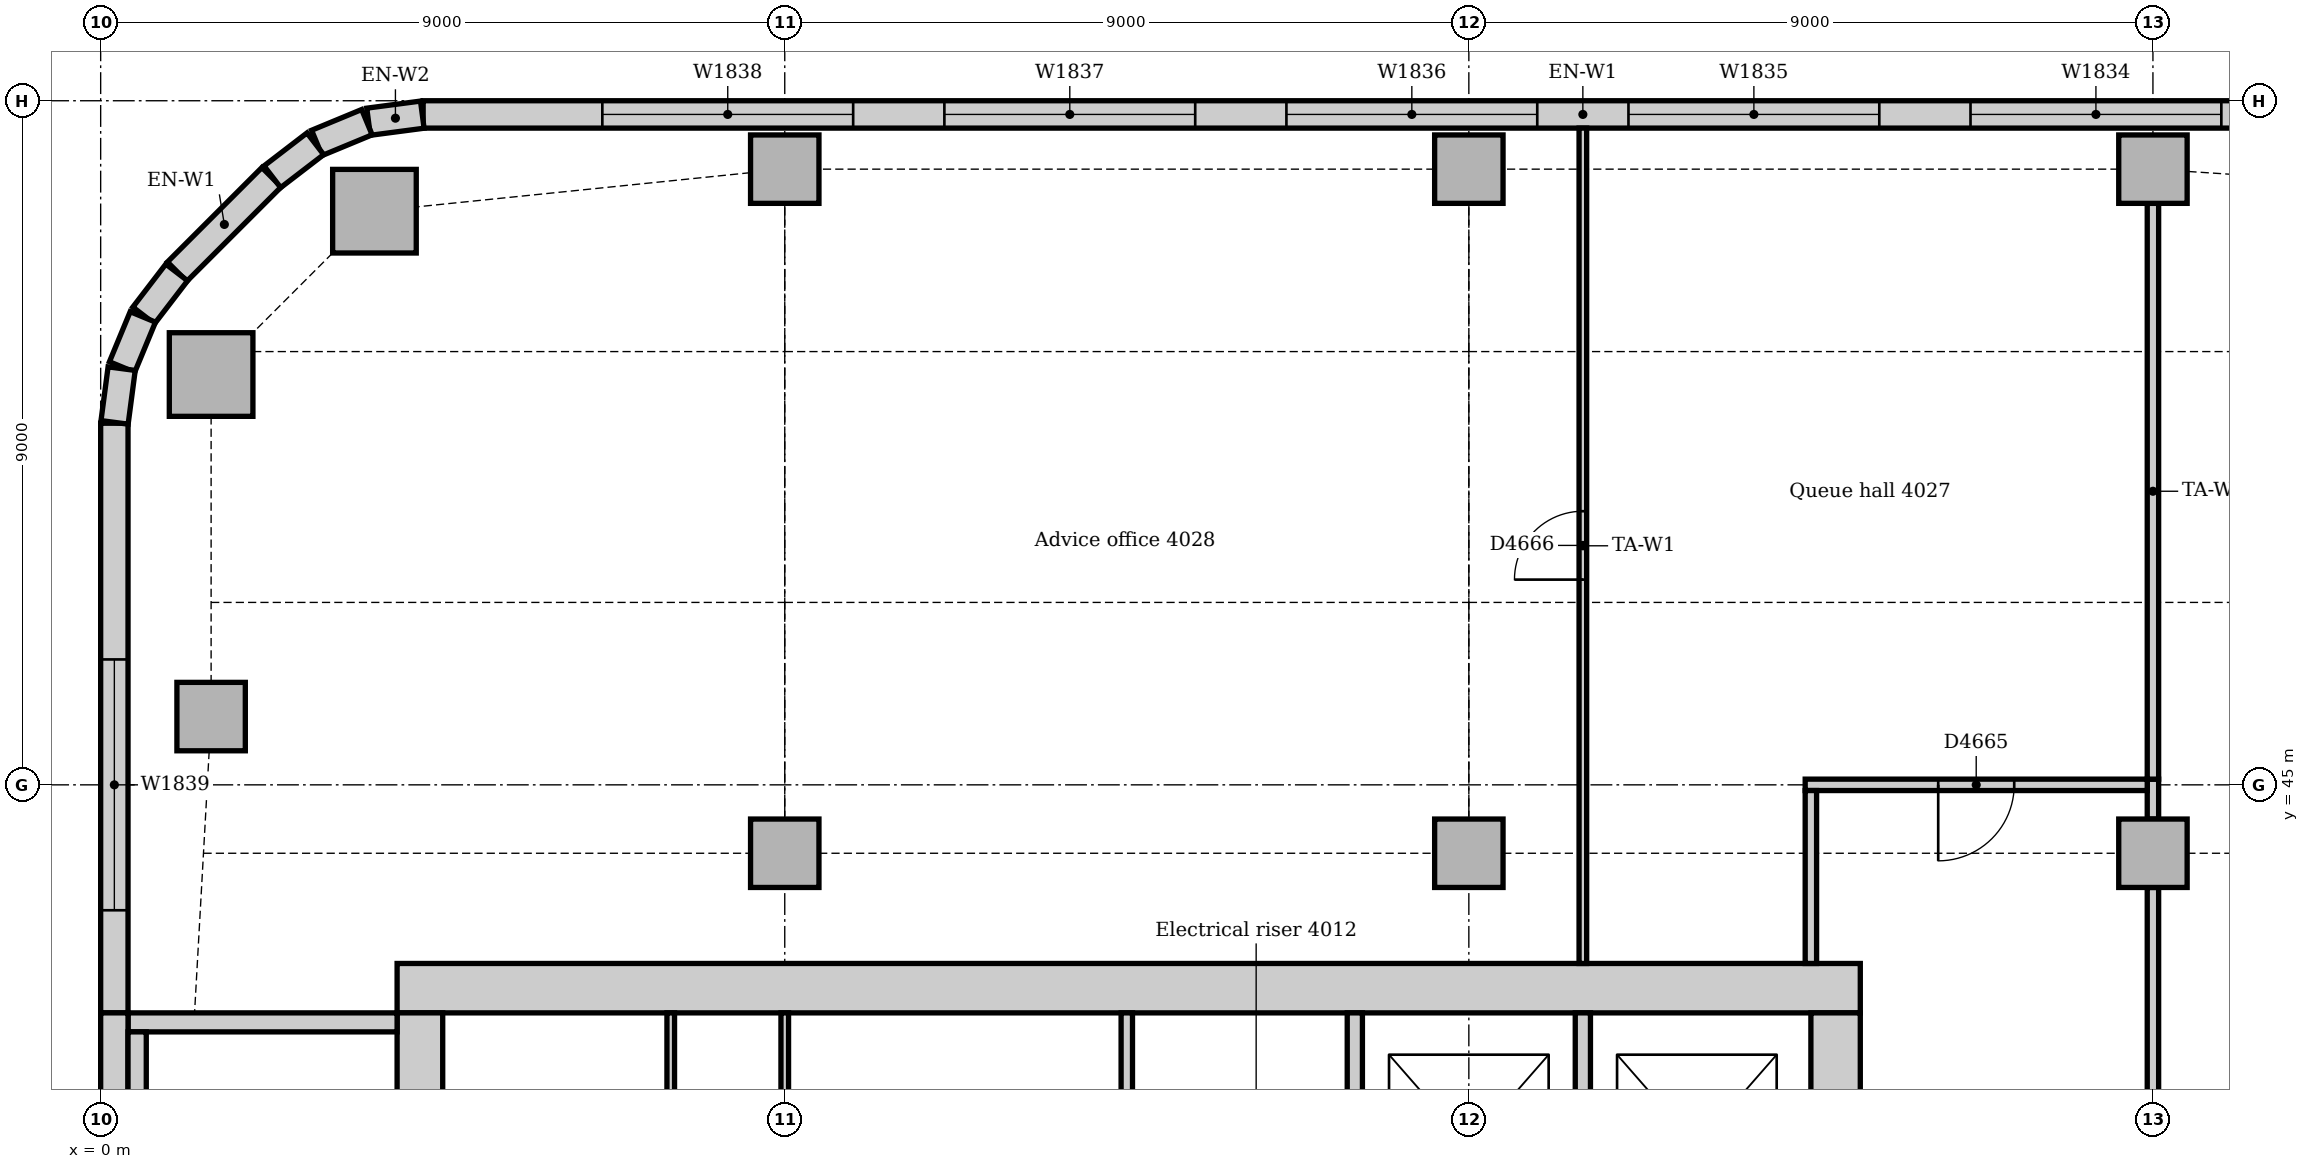
"""IFC4 building model, lengths in metres.
Left out: names, types, materials, properties, quantities, classifications, styles, units other than length and angle.
Written with IfcOpenShell. Run it as: python <this file> out.ifc"""

import sys

from ifc_helpers import new_model, si_unit, direction, frame, frame_2d, origin, origin_2d, place, context, subcontext, project, spatial, rectangle, extrude, element, fill, save


model = new_model("IFC4")
c1 = context("Model", 3, precision=1e-05, world=origin(), true_north=direction((0.0, 1.0)))
c2 = subcontext(c1, "Body", "Model", "MODEL_VIEW")
j1 = project(units=[si_unit("LENGTHUNIT", "METRE"), si_unit("PLANEANGLEUNIT", "RADIAN")], contexts=[c1])
p1 = place(None, origin())
s1 = spatial("IfcSite", under=j1, at=p1, CompositionType="ELEMENT")
p2 = place(p1, origin())
s2 = spatial("IfcBuilding", under=s1, at=p2, CompositionType="ELEMENT")
p3 = place(p2, frame((0.0, 0.0, 169.0)))
s3 = spatial("IfcBuildingStorey", under=s2, at=p3, CompositionType="ELEMENT", Elevation=169.0)
p4 = place(p3, frame((23.15, 42.325, 0.0), z_axis=(0.0, 0.0, 1.0), x_axis=(-1.0, 0.0, 0.0)))
e1 = element("IfcWall", 1, at=p4, inside=s3, PredefinedType="SOLIDWALL", context=c2, shape_type="SweptSolid", body=[
    extrude(rectangle(XDim=19.25, YDim=0.65, at=frame_2d((9.625, 0.0))), origin(), (0.0, 0.0, 1.0), 4.0),
])
p5 = place(p3, frame((22.825, 31.5, 0.0), z_axis=(0.0, 0.0, 1.0), x_axis=(0.0, 1.0, 0.0)))
e2 = element("IfcWall", 2, at=p5, inside=s3, PredefinedType="SOLIDWALL", context=c2, shape_type="SweptSolid", body=[
    extrude(rectangle(XDim=10.5, YDim=0.65, at=frame_2d((5.25, 0.0))), origin(), (0.0, 0.0, 1.0), 4.0),
])
p6 = place(p5, frame((3.15, 0.0, 0.0)))
e3 = element("IfcOpeningElement", 3, at=p6, cuts=e2, PredefinedType="OPENING", context=c2, shape_type="SweptSolid", body=[
    extrude(rectangle(XDim=1.0, YDim=2.1, at=frame_2d((0.5, 1.05))), frame((0.0, 0.335, 0.0), z_axis=(0.0, -1.0, 0.0), x_axis=(1.0, 0.0, 0.0)), (0.0, 0.0, 1.0), 0.67),
])
p7 = place(p5, frame((5.2, 0.0, 0.0)))
e4 = element("IfcOpeningElement", 4, at=p7, cuts=e2, PredefinedType="OPENING", context=c2, shape_type="SweptSolid", body=[
    extrude(rectangle(XDim=1.0, YDim=2.1, at=frame_2d((0.5, 1.05))), frame((0.0, 0.335, 0.0), z_axis=(0.0, -1.0, 0.0), x_axis=(1.0, 0.0, 0.0)), (0.0, 0.0, 1.0), 0.67),
])
p8 = place(p3, frame((4.2, 42.0, 0.0), z_axis=(0.0, 0.0, 1.0), x_axis=(0.0, -1.0, 0.0)))
e5 = element("IfcWall", 5, at=p8, inside=s3, PredefinedType="SOLIDWALL", context=c2, shape_type="SweptSolid", body=[
    extrude(rectangle(XDim=10.5, YDim=0.6, at=frame_2d((5.25, 0.0))), origin(), (0.0, 0.0, 1.0), 4.0),
])
p9 = place(p8, frame((5.3, 0.0, 0.0)))
e6 = element("IfcOpeningElement", 6, at=p9, cuts=e5, PredefinedType="OPENING", context=c2, shape_type="SweptSolid", body=[
    extrude(rectangle(XDim=1.0, YDim=2.1, at=frame_2d((0.5, 1.05))), frame((0.0, 0.31, 0.0), z_axis=(0.0, -1.0, 0.0), x_axis=(1.0, 0.0, 0.0)), (0.0, 0.0, 1.0), 0.62),
])
p10 = place(p3, frame((3.9, 41.875, 0.0), z_axis=(0.0, 0.0, 1.0), x_axis=(-1.0, 0.0, 0.0)))
e7 = element("IfcWall", 7, at=p10, inside=s3, PredefinedType="SOLIDWALL", context=c2, shape_type="SweptSolid", body=[
    extrude(rectangle(XDim=3.54, YDim=0.25, at=frame_2d((1.77, 0.0))), origin(), (0.0, 0.0, 1.0), 4.0),
])
for number, where, z_axis, x_axis in (
    (8, (3.602, 52.547, 0.0), (0.0, 0.0, 1.0), (1.0, 0.0, 0.0)),
    (9, (1.453, 50.398, 0.0), (0.0, 0.0, 1.0), (1.0, 0.0, 0.0)),
):
    element("IfcColumn", number, at=place(p3, frame(where, z_axis=z_axis, x_axis=x_axis)), inside=s3, PredefinedType="COLUMN", context=c2, shape_type="SweptSolid", body=[
        extrude(rectangle(XDim=1.1, YDim=1.1, at=origin_2d()), origin(), (0.0, 0.0, 1.0), 3.85),
    ])
for number, where, z_axis, x_axis in (
    (10, (9.0, 53.1, 0.0), (0.0, 0.0, 1.0), (1.0, 0.0, 0.0)),
    (11, (18.0, 53.1, 0.0), (0.0, 0.0, 1.0), (1.0, 0.0, 0.0)),
    (12, (27.0, 53.1, 0.0), (0.0, 0.0, 1.0), (1.0, 0.0, 0.0)),
    (13, (1.453, 45.898, 0.0), (0.0, 0.0, 1.0), (1.0, 0.0, 0.0)),
    (14, (9.0, 44.1, 0.0), (0.0, 0.0, 1.0), (1.0, 0.0, 0.0)),
    (15, (18.0, 44.1, 0.0), (0.0, 0.0, 1.0), (1.0, 0.0, 0.0)),
    (16, (27.0, 44.1, 0.0), (0.0, 0.0, 1.0), (1.0, 0.0, 0.0)),
):
    element("IfcColumn", number, at=place(p3, frame(where, z_axis=z_axis, x_axis=x_axis)), inside=s3, PredefinedType="COLUMN", context=c2, shape_type="SweptSolid", body=[
        extrude(rectangle(XDim=0.9, YDim=0.9, at=origin_2d()), origin(), (0.0, 0.0, 1.0), 3.85),
    ])
p11 = place(p3, frame((34.757, 53.82, 0.0), z_axis=(0.0, 0.0, 1.0), x_axis=(-1.0, 0.0, 0.0)))
e17 = element("IfcWall", 17, at=p11, inside=s3, PredefinedType="STANDARD", context=c2, shape_type="SweptSolid", body=[
    extrude(rectangle(XDim=30.515, YDim=0.36, at=frame_2d((15.257, 0.0))), origin(), (0.0, 0.0, 1.0), 3.85),
])
p12 = place(p11, frame((2.357, 0.0, 0.9)))
e18 = element("IfcOpeningElement", 18, at=p12, cuts=e17, PredefinedType="OPENING", context=c2, shape_type="SweptSolid", body=[
    extrude(rectangle(XDim=3.3, YDim=1.6, at=frame_2d((1.65, 0.8))), frame((0.0, 0.19, 0.0), z_axis=(0.0, -1.0, 0.0), x_axis=(1.0, 0.0, 0.0)), (0.0, 0.0, 1.0), 0.38),
])
p13 = place(p11, frame((6.857, 0.0, 0.9)))
e19 = element("IfcOpeningElement", 19, at=p13, cuts=e17, PredefinedType="OPENING", context=c2, shape_type="SweptSolid", body=[
    extrude(rectangle(XDim=3.3, YDim=1.6, at=frame_2d((1.65, 0.8))), frame((0.0, 0.19, 0.0), z_axis=(0.0, -1.0, 0.0), x_axis=(1.0, 0.0, 0.0)), (0.0, 0.0, 1.0), 0.38),
])
p14 = place(p11, frame((11.357, 0.0, 0.9)))
e20 = element("IfcOpeningElement", 20, at=p14, cuts=e17, PredefinedType="OPENING", context=c2, shape_type="SweptSolid", body=[
    extrude(rectangle(XDim=3.3, YDim=1.6, at=frame_2d((1.65, 0.8))), frame((0.0, 0.19, 0.0), z_axis=(0.0, -1.0, 0.0), x_axis=(1.0, 0.0, 0.0)), (0.0, 0.0, 1.0), 0.38),
])
p15 = place(p11, frame((15.857, 0.0, 0.9)))
e21 = element("IfcOpeningElement", 21, at=p15, cuts=e17, PredefinedType="OPENING", context=c2, shape_type="SweptSolid", body=[
    extrude(rectangle(XDim=3.3, YDim=1.6, at=frame_2d((1.65, 0.8))), frame((0.0, 0.19, 0.0), z_axis=(0.0, -1.0, 0.0), x_axis=(1.0, 0.0, 0.0)), (0.0, 0.0, 1.0), 0.38),
])
p16 = place(p11, frame((20.357, 0.0, 0.9)))
e22 = element("IfcOpeningElement", 22, at=p16, cuts=e17, PredefinedType="OPENING", context=c2, shape_type="SweptSolid", body=[
    extrude(rectangle(XDim=3.3, YDim=1.6, at=frame_2d((1.65, 0.8))), frame((0.0, 0.19, 0.0), z_axis=(0.0, -1.0, 0.0), x_axis=(1.0, 0.0, 0.0)), (0.0, 0.0, 1.0), 0.38),
])
p17 = place(p11, frame((24.857, 0.0, 0.9)))
e23 = element("IfcOpeningElement", 23, at=p17, cuts=e17, PredefinedType="OPENING", context=c2, shape_type="SweptSolid", body=[
    extrude(rectangle(XDim=3.3, YDim=1.6, at=frame_2d((1.65, 0.8))), frame((0.0, 0.19, 0.0), z_axis=(0.0, -1.0, 0.0), x_axis=(1.0, 0.0, 0.0)), (0.0, 0.0, 1.0), 0.38),
])
p18 = place(p3, frame((2.249, 52.994, 0.0), z_axis=(0.0, 0.0, 1.0), x_axis=(-0.707106781187, -0.707106781187, 0.0)))
e24 = element("IfcWall", 24, at=p18, inside=s3, PredefinedType="STANDARD", context=c2, shape_type="SweptSolid", body=[
    extrude(rectangle(XDim=1.757, YDim=0.36, at=frame_2d((0.879, 0.0))), origin(), (0.0, 0.0, 1.0), 3.85),
])
p19 = place(p3, frame((0.18, 49.757, 0.0), z_axis=(0.0, 0.0, 1.0), x_axis=(0.0, -1.0, 0.0)))
e25 = element("IfcWall", 25, at=p19, inside=s3, PredefinedType="STANDARD", context=c2, shape_type="SweptSolid", body=[
    extrude(rectangle(XDim=7.757, YDim=0.36, at=frame_2d((3.879, 0.0))), origin(), (0.0, 0.0, 1.0), 3.85),
])
p20 = place(p19, frame((3.107, 0.0, 0.9)))
e26 = element("IfcOpeningElement", 26, at=p20, cuts=e25, PredefinedType="OPENING", context=c2, shape_type="SweptSolid", body=[
    extrude(rectangle(XDim=3.3, YDim=1.6, at=frame_2d((1.65, 0.8))), frame((0.0, 0.19, 0.0), z_axis=(0.0, -1.0, 0.0), x_axis=(1.0, 0.0, 0.0)), (0.0, 0.0, 1.0), 0.38),
])
p21 = place(p3, frame((0.18, 42.0, 0.0), z_axis=(0.0, 0.0, 1.0), x_axis=(0.0, -1.0, 0.0)))
e27 = element("IfcWall", 27, at=p21, inside=s3, PredefinedType="STANDARD", context=c2, shape_type="SweptSolid", body=[
    extrude(rectangle(XDim=6.75, YDim=0.36, at=frame_2d((3.375, 0.0))), origin(), (0.0, 0.0, 1.0), 3.85),
])
for number, where, z_axis, x_axis in (
    (28, (4.231, 53.817, 0.0), (0.0, 0.0, 1.0), (-0.991, -0.131, 0.0)),
    (29, (3.503, 53.718, 0.0), (0.0, 0.0, 1.0), (-0.924, -0.383, 0.0)),
):
    element("IfcWall", number, at=place(p3, frame(where, z_axis=z_axis, x_axis=x_axis)), inside=s3, PredefinedType="STANDARD", context=c2, shape_type="SweptSolid", body=[
        extrude(rectangle(XDim=0.713, YDim=0.36, at=frame_2d((0.356, 0.0))), origin(), (0.0, 0.0, 1.0), 3.85),
    ])
for number, where, z_axis, x_axis in (
    (30, (2.825, 53.434, 0.0), (0.0, 0.0, 1.0), (-0.793, -0.609, 0.0)),
    (31, (1.0, 51.741, 0.0), (0.0, 0.0, 1.0), (-0.609, -0.793, 0.0)),
):
    element("IfcWall", number, at=place(p3, frame(where, z_axis=z_axis, x_axis=x_axis)), inside=s3, PredefinedType="STANDARD", context=c2, shape_type="SweptSolid", body=[
        extrude(rectangle(XDim=0.713, YDim=0.36, at=frame_2d((0.357, 0.0))), origin(), (0.0, 0.0, 1.0), 3.85),
    ])
for number, where, z_axis, x_axis in (
    (32, (0.555, 51.156, 0.0), (0.0, 0.0, 1.0), (-0.383, -0.924, 0.0)),
    (33, (0.276, 50.476, 0.0), (0.0, 0.0, 1.0), (-0.131, -0.991, 0.0)),
):
    element("IfcWall", number, at=place(p3, frame(where, z_axis=z_axis, x_axis=x_axis)), inside=s3, PredefinedType="STANDARD", context=c2, shape_type="SweptSolid", body=[
        extrude(rectangle(XDim=0.713, YDim=0.36, at=frame_2d((0.356, 0.0))), origin(), (0.0, 0.0, 1.0), 3.85),
    ])
p22 = place(p3, frame((0.48, 40.13, 0.0), z_axis=(0.0, 0.0, 1.0), x_axis=(0.0, 1.0, 0.0)))
e34 = element("IfcWall", 34, at=p22, inside=s3, PredefinedType="STANDARD", context=c2, shape_type="SweptSolid", body=[
    extrude(rectangle(XDim=1.62, YDim=0.24, at=frame_2d((0.81, 0.0))), origin(), (0.0, 0.0, 1.0), 4.0),
])
for number, where, z_axis, x_axis in (
    (35, (16.5, 38.6, 0.0), (0.0, 0.0, 1.0), (0.0, 1.0, 0.0)),
    (36, (19.5, 38.6, 0.0), (0.0, 0.0, 1.0), (0.0, 1.0, 0.0)),
):
    element("IfcWall", number, at=place(p3, frame(where, z_axis=z_axis, x_axis=x_axis)), inside=s3, PredefinedType="PARTITIONING", context=c2, shape_type="SweptSolid", body=[
        extrude(rectangle(XDim=3.4, YDim=0.2, at=frame_2d((1.7, 0.0))), origin(), (0.0, 0.0, 1.0), 3.85),
    ])
p23 = place(p3, frame((27.0, 36.45, 0.0), z_axis=(0.0, 0.0, 1.0), x_axis=(0.0, 1.0, 0.0)))
e37 = element("IfcWall", 37, at=p23, inside=s3, PredefinedType="PARTITIONING", context=c2, shape_type="SweptSolid", body=[
    extrude(rectangle(XDim=7.2, YDim=0.15, at=frame_2d((3.6, 0.0))), origin(), (0.0, 0.0, 1.0), 3.362),
])
p24 = place(p3, frame((27.0, 44.55, 0.0), z_axis=(0.0, 0.0, 1.0), x_axis=(0.0, 1.0, 0.0)))
e38 = element("IfcWall", 38, at=p24, inside=s3, PredefinedType="PARTITIONING", context=c2, shape_type="SweptSolid", body=[
    extrude(rectangle(XDim=0.525, YDim=0.15, at=frame_2d((0.263, 0.0))), origin(), (0.0, 0.0, 1.0), 3.362),
])
p25 = place(p3, frame((22.425, 45.0, 0.0), z_axis=(0.0, 0.0, 1.0), x_axis=(1.0, 0.0, 0.0)))
e39 = element("IfcWall", 39, at=p25, inside=s3, PredefinedType="PARTITIONING", context=c2, shape_type="SweptSolid", body=[
    extrude(rectangle(XDim=4.5, YDim=0.15, at=frame_2d((2.25, 0.0))), origin(), (0.0, 0.0, 1.0), 3.85),
])
p26 = place(p25, frame((1.75, 0.0, 0.0)))
e40 = element("IfcOpeningElement", 40, at=p26, cuts=e39, PredefinedType="OPENING", context=c2, shape_type="SweptSolid", body=[
    extrude(rectangle(XDim=1.0, YDim=2.1, at=frame_2d((0.5, 1.05))), frame((0.0, 0.085, 0.0), z_axis=(0.0, -1.0, 0.0), x_axis=(1.0, 0.0, 0.0)), (0.0, 0.0, 1.0), 0.17),
])
p27 = place(p3, frame((22.5, 42.65, 0.0), z_axis=(0.0, 0.0, 1.0), x_axis=(0.0, 1.0, 0.0)))
e41 = element("IfcWall", 41, at=p27, inside=s3, PredefinedType="PARTITIONING", context=c2, shape_type="SweptSolid", body=[
    extrude(rectangle(XDim=2.275, YDim=0.15, at=frame_2d((1.137, 0.0))), origin(), (0.0, 0.0, 1.0), 3.85),
])
p28 = place(p3, frame((13.5, 38.575, 0.0), z_axis=(0.0, 0.0, 1.0), x_axis=(0.0, 1.0, 0.0)))
e42 = element("IfcWall", 42, at=p28, inside=s3, PredefinedType="PARTITIONING", context=c2, shape_type="SweptSolid", body=[
    extrude(rectangle(XDim=3.425, YDim=0.15, at=frame_2d((1.712, 0.0))), origin(), (0.0, 0.0, 1.0), 3.85),
])
p29 = place(p3, frame((27.0, 45.075, 0.0), z_axis=(0.0, 0.0, 1.0), x_axis=(0.0, 1.0, 0.0)))
e43 = element("IfcWall", 43, at=p29, inside=s3, PredefinedType="PARTITIONING", context=c2, shape_type="SweptSolid", body=[
    extrude(rectangle(XDim=7.575, YDim=0.15, at=frame_2d((3.788, 0.0))), origin(), (0.0, 0.0, 1.0), 3.362),
])
p30 = place(p3, frame((19.5, 42.65, 0.0), z_axis=(0.0, 0.0, 1.0), x_axis=(0.0, 1.0, 0.0)))
e44 = element("IfcWall", 44, at=p30, inside=s3, PredefinedType="PARTITIONING", context=c2, shape_type="SweptSolid", body=[
    extrude(rectangle(XDim=10.99, YDim=0.1, at=frame_2d((5.495, 0.0))), origin(), (0.0, 0.0, 1.0), 3.85),
])
p31 = place(p30, frame((5.05, 0.0, 0.0)))
e45 = element("IfcOpeningElement", 45, at=p31, cuts=e44, PredefinedType="OPENING", context=c2, shape_type="SweptSolid", body=[
    extrude(rectangle(XDim=0.9, YDim=2.1, at=frame_2d((0.45, 1.05))), frame((0.0, 0.06, 0.0), z_axis=(0.0, -1.0, 0.0), x_axis=(1.0, 0.0, 0.0)), (0.0, 0.0, 1.0), 0.12),
])
for number, where, z_axis, x_axis in (
    (46, (7.5, 38.575, 0.0), (0.0, 0.0, 1.0), (0.0, 1.0, 0.0)),
    (47, (9.0, 38.575, 0.0), (0.0, 0.0, 1.0), (0.0, 1.0, 0.0)),
):
    element("IfcWall", number, at=place(p3, frame(where, z_axis=z_axis, x_axis=x_axis)), inside=s3, PredefinedType="PARTITIONING", context=c2, shape_type="SweptSolid", body=[
        extrude(rectangle(XDim=3.425, YDim=0.1, at=frame_2d((1.712, 0.0))), origin(), (0.0, 0.0, 1.0), 3.85),
    ])
p32 = place(p13, origin())
e48 = element("IfcWindow", 48, at=p32, inside=s3, PartitioningType="SINGLE_PANEL", PredefinedType="WINDOW", context=c2, shape_type="SweptSolid", body=[
    extrude(rectangle(XDim=3.3, YDim=1.6, at=frame_2d((1.65, 0.8))), frame((0.0, 0.13, 0.0), z_axis=(0.0, -1.0, 0.0), x_axis=(1.0, 0.0, 0.0)), (0.0, 0.0, 1.0), 0.06),
])
fill(e19, e48)
p33 = place(p14, origin())
e49 = element("IfcWindow", 49, at=p33, inside=s3, PartitioningType="SINGLE_PANEL", PredefinedType="WINDOW", context=c2, shape_type="SweptSolid", body=[
    extrude(rectangle(XDim=3.3, YDim=1.6, at=frame_2d((1.65, 0.8))), frame((0.0, 0.13, 0.0), z_axis=(0.0, -1.0, 0.0), x_axis=(1.0, 0.0, 0.0)), (0.0, 0.0, 1.0), 0.06),
])
fill(e20, e49)
p34 = place(p15, origin())
e50 = element("IfcWindow", 50, at=p34, inside=s3, PartitioningType="SINGLE_PANEL", PredefinedType="WINDOW", context=c2, shape_type="SweptSolid", body=[
    extrude(rectangle(XDim=3.3, YDim=1.6, at=frame_2d((1.65, 0.8))), frame((0.0, 0.13, 0.0), z_axis=(0.0, -1.0, 0.0), x_axis=(1.0, 0.0, 0.0)), (0.0, 0.0, 1.0), 0.06),
])
fill(e21, e50)
p35 = place(p16, origin())
e51 = element("IfcWindow", 51, at=p35, inside=s3, PartitioningType="SINGLE_PANEL", PredefinedType="WINDOW", context=c2, shape_type="SweptSolid", body=[
    extrude(rectangle(XDim=3.3, YDim=1.6, at=frame_2d((1.65, 0.8))), frame((0.0, 0.13, 0.0), z_axis=(0.0, -1.0, 0.0), x_axis=(1.0, 0.0, 0.0)), (0.0, 0.0, 1.0), 0.06),
])
fill(e22, e51)
p36 = place(p17, origin())
e52 = element("IfcWindow", 52, at=p36, inside=s3, PartitioningType="SINGLE_PANEL", PredefinedType="WINDOW", context=c2, shape_type="SweptSolid", body=[
    extrude(rectangle(XDim=3.3, YDim=1.6, at=frame_2d((1.65, 0.8))), frame((0.0, 0.13, 0.0), z_axis=(0.0, -1.0, 0.0), x_axis=(1.0, 0.0, 0.0)), (0.0, 0.0, 1.0), 0.06),
])
fill(e23, e52)
p37 = place(p20, origin())
e53 = element("IfcWindow", 53, at=p37, inside=s3, PartitioningType="SINGLE_PANEL", PredefinedType="WINDOW", context=c2, shape_type="SweptSolid", body=[
    extrude(rectangle(XDim=3.3, YDim=1.6, at=frame_2d((1.65, 0.8))), frame((0.0, 0.13, 0.0), z_axis=(0.0, -1.0, 0.0), x_axis=(1.0, 0.0, 0.0)), (0.0, 0.0, 1.0), 0.06),
])
fill(e26, e53)
p38 = place(p26, frame((1.0, 0.0, 0.0), z_axis=(0.0, 0.0, 1.0), x_axis=(-1.0, 0.0, 0.0)))
e54 = element("IfcDoor", 54, at=p38, inside=s3, OperationType="SINGLE_SWING_RIGHT", PredefinedType="DOOR", context=c2, shape_type="SweptSolid", body=[
    extrude(rectangle(XDim=1.0, YDim=2.1, at=frame_2d((0.5, 1.05))), frame((0.0, 0.025, 0.0), z_axis=(0.0, -1.0, 0.0), x_axis=(1.0, 0.0, 0.0)), (0.0, 0.0, 1.0), 0.05),
])
fill(e40, e54)
p39 = place(p31, origin())
e55 = element("IfcDoor", 55, at=p39, inside=s3, OperationType="SINGLE_SWING_LEFT", PredefinedType="DOOR", context=c2, shape_type="SweptSolid", body=[
    extrude(rectangle(XDim=0.9, YDim=2.1, at=frame_2d((0.45, 1.05))), frame((0.0, 0.025, 0.0), z_axis=(0.0, -1.0, 0.0), x_axis=(1.0, 0.0, 0.0)), (0.0, 0.0, 1.0), 0.05),
])
fill(e45, e55)
save(model, sys.argv[1])
